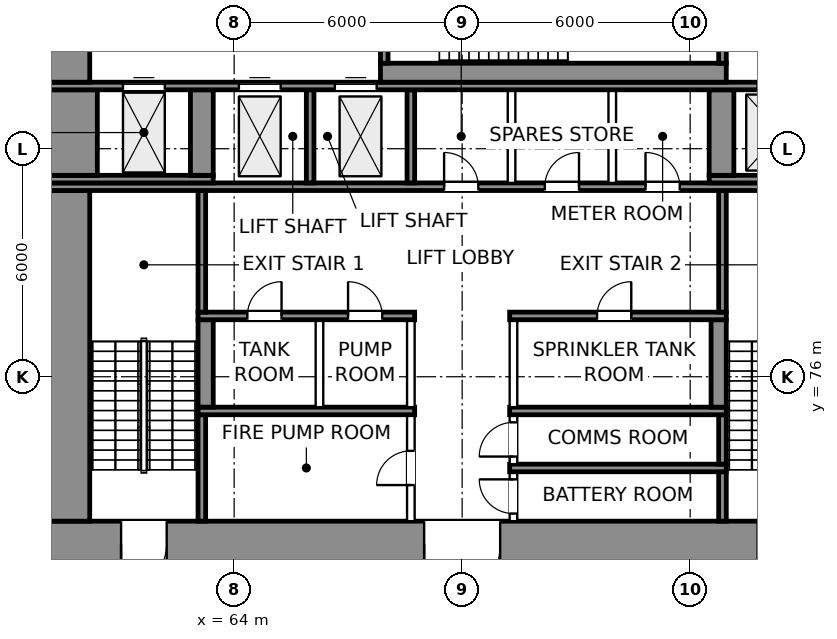
"""IFC4 building model, lengths in metres.
Left out: names, types, materials, properties, quantities, classifications, styles, units other than length and angle.
Written with IfcOpenShell. Run it as: python <this file> out.ifc"""

import sys

from ifc_helpers import new_model, si_unit, direction, frame, frame_2d, origin, place, context, subcontext, project, spatial, rectangle, extrude, element, fill, save


model = new_model("IFC4")
c1 = context("Model", 3, precision=1e-05, world=origin(), true_north=direction((0.0, 1.0)))
c2 = subcontext(c1, "Body", "Model", "MODEL_VIEW")
j1 = project(units=[si_unit("LENGTHUNIT", "METRE"), si_unit("PLANEANGLEUNIT", "RADIAN")], contexts=[c1])
p1 = place(None, origin())
s1 = spatial("IfcSite", under=j1, at=p1, CompositionType="ELEMENT")
p2 = place(p1, origin())
s2 = spatial("IfcBuilding", under=s1, at=p2, CompositionType="ELEMENT")
p3 = place(p2, frame((0.0, 0.0, -10.0)))
s3 = spatial("IfcBuildingStorey", under=s2, at=p3, CompositionType="ELEMENT", Elevation=-10.0)
p4 = place(p3, frame((59.0, 71.6, 0.0), z_axis=(0.0, 0.0, 1.0), x_axis=(1.0, 0.0, 0.0)))
e1 = element("IfcWall", 1, at=p4, inside=s3, PredefinedType="SHEAR", context=c2, shape_type="SweptSolid", body=[
    extrude(rectangle(XDim=22.0, YDim=1.2, at=frame_2d((11.0, 0.0))), origin(), (0.0, 0.0, 1.0), 5.0),
])
p5 = place(p4, frame((2.025, 0.0, 0.0)))
e2 = element("IfcOpeningElement", 2, at=p5, cuts=e1, PredefinedType="OPENING", context=c2, shape_type="SweptSolid", body=[
    extrude(rectangle(XDim=1.2, YDim=2.1, at=frame_2d((0.6, 1.05))), frame((0.0, 0.61, 0.0), z_axis=(0.0, -1.0, 0.0), x_axis=(1.0, 0.0, 0.0)), (0.0, 0.0, 1.0), 1.22),
])
p6 = place(p4, frame((18.775, 0.0, 0.0)))
e3 = element("IfcOpeningElement", 3, at=p6, cuts=e1, PredefinedType="OPENING", context=c2, shape_type="SweptSolid", body=[
    extrude(rectangle(XDim=1.2, YDim=2.1, at=frame_2d((0.6, 1.05))), frame((0.0, 0.61, 0.0), z_axis=(0.0, -1.0, 0.0), x_axis=(1.0, 0.0, 0.0)), (0.0, 0.0, 1.0), 1.22),
])
p7 = place(p4, frame((10.0, 0.0, 0.0)))
e4 = element("IfcOpeningElement", 4, at=p7, cuts=e1, PredefinedType="OPENING", context=c2, shape_type="SweptSolid", body=[
    extrude(rectangle(XDim=2.0, YDim=2.1, at=frame_2d((1.0, 1.05))), frame((0.0, 0.61, 0.0), z_axis=(0.0, -1.0, 0.0), x_axis=(1.0, 0.0, 0.0)), (0.0, 0.0, 1.0), 1.22),
])
p8 = place(p3, frame((59.6, 72.2, 0.0), z_axis=(0.0, 0.0, 1.0), x_axis=(0.0, 1.0, 0.0)))
e5 = element("IfcWall", 5, at=p8, inside=s3, PredefinedType="SHEAR", context=c2, shape_type="SweptSolid", body=[
    extrude(rectangle(XDim=8.7, YDim=1.2, at=frame_2d((4.35, 0.0))), origin(), (0.0, 0.0, 1.0), 5.0),
])
p9 = place(p3, frame((63.15, 72.2, 0.0), z_axis=(0.0, 0.0, 1.0), x_axis=(0.0, 1.0, 0.0)))
e6 = element("IfcWall", 6, at=p9, inside=s3, PredefinedType="SHEAR", context=c2, shape_type="SweptSolid", body=[
    extrude(rectangle(XDim=2.8, YDim=0.2, at=frame_2d((1.4, 0.0))), origin(), (0.0, 0.0, 1.0), 5.0),
])
p10 = place(p3, frame((68.65, 72.2, 0.0), z_axis=(0.0, 0.0, 1.0), x_axis=(0.0, 1.0, 0.0)))
e7 = element("IfcWall", 7, at=p10, inside=s3, PredefinedType="PARTITIONING", context=c2, shape_type="SweptSolid", body=[
    extrude(rectangle(XDim=2.8, YDim=0.2, at=frame_2d((1.4, 0.0))), origin(), (0.0, 0.0, 1.0), 4.65),
])
p11 = place(p10, frame((0.95, 0.0, 0.0)))
e8 = element("IfcOpeningElement", 8, at=p11, cuts=e7, PredefinedType="OPENING", context=c2, shape_type="SweptSolid", body=[
    extrude(rectangle(XDim=0.9, YDim=2.1, at=frame_2d((0.45, 1.05))), frame((0.0, 0.11, 0.0), z_axis=(0.0, -1.0, 0.0), x_axis=(1.0, 0.0, 0.0)), (0.0, 0.0, 1.0), 0.22),
])
p12 = place(p3, frame((71.35, 72.2, 0.0), z_axis=(0.0, 0.0, 1.0), x_axis=(0.0, 1.0, 0.0)))
e9 = element("IfcWall", 9, at=p12, inside=s3, PredefinedType="PARTITIONING", context=c2, shape_type="SweptSolid", body=[
    extrude(rectangle(XDim=1.3, YDim=0.2, at=frame_2d((0.65, 0.0))), origin(), (0.0, 0.0, 1.0), 4.65),
])
p13 = place(p12, frame((0.2, 0.0, 0.0)))
e10 = element("IfcOpeningElement", 10, at=p13, cuts=e9, PredefinedType="OPENING", context=c2, shape_type="SweptSolid", body=[
    extrude(rectangle(XDim=0.9, YDim=2.1, at=frame_2d((0.45, 1.05))), frame((0.0, 0.11, 0.0), z_axis=(0.0, -1.0, 0.0), x_axis=(1.0, 0.0, 0.0)), (0.0, 0.0, 1.0), 0.22),
])
p14 = place(p3, frame((76.85, 72.2, 0.0), z_axis=(0.0, 0.0, 1.0), x_axis=(0.0, 1.0, 0.0)))
e11 = element("IfcWall", 11, at=p14, inside=s3, PredefinedType="SHEAR", context=c2, shape_type="SweptSolid", body=[
    extrude(rectangle(XDim=1.3, YDim=0.2, at=frame_2d((0.65, 0.0))), origin(), (0.0, 0.0, 1.0), 5.0),
])
p15 = place(p3, frame((71.25, 73.6, 0.0), z_axis=(0.0, 0.0, 1.0), x_axis=(1.0, 0.0, 0.0)))
e12 = element("IfcWall", 12, at=p15, inside=s3, PredefinedType="SHEAR", context=c2, shape_type="SweptSolid", body=[
    extrude(rectangle(XDim=5.7, YDim=0.2, at=frame_2d((2.85, 0.0))), origin(), (0.0, 0.0, 1.0), 5.0),
])
p16 = place(p3, frame((71.35, 73.7, 0.0), z_axis=(0.0, 0.0, 1.0), x_axis=(0.0, 1.0, 0.0)))
e13 = element("IfcWall", 13, at=p16, inside=s3, PredefinedType="PARTITIONING", context=c2, shape_type="SweptSolid", body=[
    extrude(rectangle(XDim=1.3, YDim=0.2, at=frame_2d((0.65, 0.0))), origin(), (0.0, 0.0, 1.0), 4.65),
])
p17 = place(p16, frame((0.2, 0.0, 0.0)))
e14 = element("IfcOpeningElement", 14, at=p17, cuts=e13, PredefinedType="OPENING", context=c2, shape_type="SweptSolid", body=[
    extrude(rectangle(XDim=0.9, YDim=2.1, at=frame_2d((0.45, 1.05))), frame((0.0, 0.11, 0.0), z_axis=(0.0, -1.0, 0.0), x_axis=(1.0, 0.0, 0.0)), (0.0, 0.0, 1.0), 0.22),
])
p18 = place(p3, frame((76.85, 73.7, 0.0), z_axis=(0.0, 0.0, 1.0), x_axis=(0.0, 1.0, 0.0)))
e15 = element("IfcWall", 15, at=p18, inside=s3, PredefinedType="SHEAR", context=c2, shape_type="SweptSolid", body=[
    extrude(rectangle(XDim=1.3, YDim=0.2, at=frame_2d((0.65, 0.0))), origin(), (0.0, 0.0, 1.0), 5.0),
])
for number, where, z_axis, x_axis in (
    (16, (63.05, 75.1, 0.0), (0.0, 0.0, 1.0), (1.0, 0.0, 0.0)),
    (17, (71.25, 75.1, 0.0), (0.0, 0.0, 1.0), (1.0, 0.0, 0.0)),
):
    element("IfcWall", number, at=place(p3, frame(where, z_axis=z_axis, x_axis=x_axis)), inside=s3, PredefinedType="SHEAR", context=c2, shape_type="SweptSolid", body=[
        extrude(rectangle(XDim=5.7, YDim=0.2, at=frame_2d((2.85, 0.0))), origin(), (0.0, 0.0, 1.0), 5.0),
    ])
p19 = place(p3, frame((63.25, 75.2, 0.0), z_axis=(0.0, 0.0, 1.0), x_axis=(0.0, 1.0, 0.0)))
e18 = element("IfcWall", 18, at=p19, inside=s3, PredefinedType="SHEAR", context=c2, shape_type="SweptSolid", body=[
    extrude(rectangle(XDim=2.3, YDim=0.4, at=frame_2d((1.15, 0.0))), origin(), (0.0, 0.0, 1.0), 5.0),
])
for number, where, z_axis, x_axis in (
    (19, (66.245, 75.2, 0.0), (0.0, 0.0, 1.0), (0.0, 1.0, 0.0)),
    (20, (68.65, 75.2, 0.0), (0.0, 0.0, 1.0), (0.0, 1.0, 0.0)),
    (21, (71.35, 75.2, 0.0), (0.0, 0.0, 1.0), (0.0, 1.0, 0.0)),
):
    element("IfcWall", number, at=place(p3, frame(where, z_axis=z_axis, x_axis=x_axis)), inside=s3, PredefinedType="PARTITIONING", context=c2, shape_type="SweptSolid", body=[
        extrude(rectangle(XDim=2.3, YDim=0.2, at=frame_2d((1.15, 0.0))), origin(), (0.0, 0.0, 1.0), 4.65),
    ])
p20 = place(p3, frame((76.75, 75.2, 0.0), z_axis=(0.0, 0.0, 1.0), x_axis=(0.0, 1.0, 0.0)))
e22 = element("IfcWall", 22, at=p20, inside=s3, PredefinedType="SHEAR", context=c2, shape_type="SweptSolid", body=[
    extrude(rectangle(XDim=2.3, YDim=0.4, at=frame_2d((1.15, 0.0))), origin(), (0.0, 0.0, 1.0), 5.0),
])
p21 = place(p3, frame((63.05, 77.6, 0.0), z_axis=(0.0, 0.0, 1.0), x_axis=(1.0, 0.0, 0.0)))
e23 = element("IfcWall", 23, at=p21, inside=s3, PredefinedType="SHEAR", context=c2, shape_type="SweptSolid", body=[
    extrude(rectangle(XDim=5.7, YDim=0.2, at=frame_2d((2.85, 0.0))), origin(), (0.0, 0.0, 1.0), 5.0),
])
p22 = place(p21, frame((1.298, 0.0, 0.0)))
e24 = element("IfcOpeningElement", 24, at=p22, cuts=e23, PredefinedType="OPENING", context=c2, shape_type="SweptSolid", body=[
    extrude(rectangle(XDim=0.9, YDim=2.1, at=frame_2d((0.45, 1.05))), frame((0.0, 0.11, 0.0), z_axis=(0.0, -1.0, 0.0), x_axis=(1.0, 0.0, 0.0)), (0.0, 0.0, 1.0), 0.22),
])
p23 = place(p21, frame((3.948, 0.0, 0.0)))
e25 = element("IfcOpeningElement", 25, at=p23, cuts=e23, PredefinedType="OPENING", context=c2, shape_type="SweptSolid", body=[
    extrude(rectangle(XDim=0.9, YDim=2.1, at=frame_2d((0.45, 1.05))), frame((0.0, 0.11, 0.0), z_axis=(0.0, -1.0, 0.0), x_axis=(1.0, 0.0, 0.0)), (0.0, 0.0, 1.0), 0.22),
])
p24 = place(p3, frame((71.25, 77.6, 0.0), z_axis=(0.0, 0.0, 1.0), x_axis=(1.0, 0.0, 0.0)))
e26 = element("IfcWall", 26, at=p24, inside=s3, PredefinedType="SHEAR", context=c2, shape_type="SweptSolid", body=[
    extrude(rectangle(XDim=5.7, YDim=0.2, at=frame_2d((2.85, 0.0))), origin(), (0.0, 0.0, 1.0), 5.0),
])
p25 = place(p24, frame((2.3, 0.0, 0.0)))
e27 = element("IfcOpeningElement", 27, at=p25, cuts=e26, PredefinedType="OPENING", context=c2, shape_type="SweptSolid", body=[
    extrude(rectangle(XDim=0.9, YDim=2.1, at=frame_2d((0.45, 1.05))), frame((0.0, 0.11, 0.0), z_axis=(0.0, -1.0, 0.0), x_axis=(1.0, 0.0, 0.0)), (0.0, 0.0, 1.0), 0.22),
])
for number, where, z_axis, x_axis in (
    (28, (63.15, 77.7, 0.0), (0.0, 0.0, 1.0), (0.0, 1.0, 0.0)),
    (29, (76.85, 77.7, 0.0), (0.0, 0.0, 1.0), (0.0, 1.0, 0.0)),
):
    element("IfcWall", number, at=place(p3, frame(where, z_axis=z_axis, x_axis=x_axis)), inside=s3, PredefinedType="SHEAR", context=c2, shape_type="SweptSolid", body=[
        extrude(rectangle(XDim=3.2, YDim=0.2, at=frame_2d((1.6, 0.0))), origin(), (0.0, 0.0, 1.0), 5.0),
    ])
p26 = place(p3, frame((59.0, 81.0, 0.0), z_axis=(0.0, 0.0, 1.0), x_axis=(1.0, 0.0, 0.0)))
e30 = element("IfcWall", 30, at=p26, inside=s3, PredefinedType="SHEAR", context=c2, shape_type="SweptSolid", body=[
    extrude(rectangle(XDim=22.0, YDim=0.2, at=frame_2d((11.0, 0.0))), origin(), (0.0, 0.0, 1.0), 5.0),
])
p27 = place(p26, frame((10.525, 0.0, 0.0)))
e31 = element("IfcOpeningElement", 31, at=p27, cuts=e30, PredefinedType="OPENING", context=c2, shape_type="SweptSolid", body=[
    extrude(rectangle(XDim=0.9, YDim=2.1, at=frame_2d((0.45, 1.05))), frame((0.0, 0.11, 0.0), z_axis=(0.0, -1.0, 0.0), x_axis=(1.0, 0.0, 0.0)), (0.0, 0.0, 1.0), 0.22),
])
p28 = place(p26, frame((13.175, 0.0, 0.0)))
e32 = element("IfcOpeningElement", 32, at=p28, cuts=e30, PredefinedType="OPENING", context=c2, shape_type="SweptSolid", body=[
    extrude(rectangle(XDim=0.9, YDim=2.1, at=frame_2d((0.45, 1.05))), frame((0.0, 0.11, 0.0), z_axis=(0.0, -1.0, 0.0), x_axis=(1.0, 0.0, 0.0)), (0.0, 0.0, 1.0), 0.22),
])
p29 = place(p26, frame((15.825, 0.0, 0.0)))
e33 = element("IfcOpeningElement", 33, at=p29, cuts=e30, PredefinedType="OPENING", context=c2, shape_type="SweptSolid", body=[
    extrude(rectangle(XDim=0.9, YDim=2.1, at=frame_2d((0.45, 1.05))), frame((0.0, 0.11, 0.0), z_axis=(0.0, -1.0, 0.0), x_axis=(1.0, 0.0, 0.0)), (0.0, 0.0, 1.0), 0.22),
])
p30 = place(p3, frame((59.0, 81.2, 0.0), z_axis=(0.0, 0.0, 1.0), x_axis=(1.0, 0.0, 0.0)))
e34 = element("IfcWall", 34, at=p30, inside=s3, PredefinedType="SHEAR", context=c2, shape_type="SweptSolid", body=[
    extrude(rectangle(XDim=4.45, YDim=0.2, at=frame_2d((2.225, 0.0))), origin(), (0.0, 0.0, 1.0), 5.0),
])
for number, where, z_axis, x_axis in (
    (35, (66.0, 81.1, 0.0), (0.0, 0.0, 1.0), (0.0, 1.0, 0.0)),
    (36, (68.65, 81.1, 0.0), (0.0, 0.0, 1.0), (0.0, 1.0, 0.0)),
):
    element("IfcWall", number, at=place(p3, frame(where, z_axis=z_axis, x_axis=x_axis)), inside=s3, PredefinedType="SHEAR", context=c2, shape_type="SweptSolid", body=[
        extrude(rectangle(XDim=2.45, YDim=0.2, at=frame_2d((1.225, 0.0))), origin(), (0.0, 0.0, 1.0), 5.0),
    ])
for number, where, z_axis, x_axis in (
    (37, (71.3, 81.1, 0.0), (0.0, 0.0, 1.0), (0.0, 1.0, 0.0)),
    (38, (73.95, 81.1, 0.0), (0.0, 0.0, 1.0), (0.0, 1.0, 0.0)),
):
    element("IfcWall", number, at=place(p3, frame(where, z_axis=z_axis, x_axis=x_axis)), inside=s3, PredefinedType="PARTITIONING", context=c2, shape_type="SweptSolid", body=[
        extrude(rectangle(XDim=2.45, YDim=0.2, at=frame_2d((1.225, 0.0))), origin(), (0.0, 0.0, 1.0), 4.65),
    ])
p31 = place(p3, frame((76.5, 81.2, 0.0), z_axis=(0.0, 0.0, 1.0), x_axis=(1.0, 0.0, 0.0)))
e39 = element("IfcWall", 39, at=p31, inside=s3, PredefinedType="SHEAR", context=c2, shape_type="SweptSolid", body=[
    extrude(rectangle(XDim=4.5, YDim=0.2, at=frame_2d((2.25, 0.0))), origin(), (0.0, 0.0, 1.0), 5.0),
])
p32 = place(p3, frame((59.7, 81.3, 0.0), z_axis=(0.0, 0.0, 1.0), x_axis=(0.0, 1.0, 0.0)))
e40 = element("IfcWall", 40, at=p32, inside=s3, PredefinedType="SHEAR", context=c2, shape_type="SweptSolid", body=[
    extrude(rectangle(XDim=2.25, YDim=1.4, at=frame_2d((1.125, 0.0))), origin(), (0.0, 0.0, 1.0), 5.0),
])
p33 = place(p3, frame((63.15, 81.3, 0.0), z_axis=(0.0, 0.0, 1.0), x_axis=(0.0, 1.0, 0.0)))
e41 = element("IfcWall", 41, at=p33, inside=s3, PredefinedType="SHEAR", context=c2, shape_type="SweptSolid", body=[
    extrude(rectangle(XDim=2.25, YDim=0.6, at=frame_2d((1.125, 0.0))), origin(), (0.0, 0.0, 1.0), 5.0),
])
p34 = place(p3, frame((76.825, 81.3, 0.0), z_axis=(0.0, 0.0, 1.0), x_axis=(0.0, 1.0, 0.0)))
e42 = element("IfcWall", 42, at=p34, inside=s3, PredefinedType="SHEAR", context=c2, shape_type="SweptSolid", body=[
    extrude(rectangle(XDim=2.25, YDim=0.65, at=frame_2d((1.125, 0.0))), origin(), (0.0, 0.0, 1.0), 5.0),
])
p35 = place(p3, frame((59.0, 83.65, 0.0), z_axis=(0.0, 0.0, 1.0), x_axis=(1.0, 0.0, 0.0)))
e43 = element("IfcWall", 43, at=p35, inside=s3, PredefinedType="SHEAR", context=c2, shape_type="SweptSolid", body=[
    extrude(rectangle(XDim=22.0, YDim=0.2, at=frame_2d((11.0, 0.0))), origin(), (0.0, 0.0, 1.0), 5.0),
])
p36 = place(p35, frame((5.125, 0.0, 0.0)))
e44 = element("IfcOpeningElement", 44, at=p36, cuts=e43, PredefinedType="OPENING", context=c2, shape_type="SweptSolid", body=[
    extrude(rectangle(XDim=1.1, YDim=2.1, at=frame_2d((0.55, 1.05))), frame((0.0, 0.11, 0.0), z_axis=(0.0, -1.0, 0.0), x_axis=(1.0, 0.0, 0.0)), (0.0, 0.0, 1.0), 0.22),
])
p37 = place(p35, frame((7.65, 0.0, 0.0)))
e45 = element("IfcOpeningElement", 45, at=p37, cuts=e43, PredefinedType="OPENING", context=c2, shape_type="SweptSolid", body=[
    extrude(rectangle(XDim=1.1, YDim=2.1, at=frame_2d((0.55, 1.05))), frame((0.0, 0.11, 0.0), z_axis=(0.0, -1.0, 0.0), x_axis=(1.0, 0.0, 0.0)), (0.0, 0.0, 1.0), 0.22),
])
p38 = place(p35, frame((18.775, 0.0, 0.0)))
e46 = element("IfcOpeningElement", 46, at=p38, cuts=e43, PredefinedType="OPENING", context=c2, shape_type="SweptSolid", body=[
    extrude(rectangle(XDim=1.2, YDim=2.1, at=frame_2d((0.6, 1.05))), frame((0.0, 0.11, 0.0), z_axis=(0.0, -1.0, 0.0), x_axis=(1.0, 0.0, 0.0)), (0.0, 0.0, 1.0), 0.22),
])
p39 = place(p35, frame((2.075, 0.0, 0.0)))
e47 = element("IfcOpeningElement", 47, at=p39, cuts=e43, PredefinedType="OPENING", context=c2, shape_type="SweptSolid", body=[
    extrude(rectangle(XDim=1.1, YDim=2.1, at=frame_2d((0.55, 1.05))), frame((0.0, 0.11, 0.0), z_axis=(0.0, -1.0, 0.0), x_axis=(1.0, 0.0, 0.0)), (0.0, 0.0, 1.0), 0.22),
])
p40 = place(p3, frame((59.6, 83.75, 0.0), z_axis=(0.0, 0.0, 1.0), x_axis=(0.0, 1.0, 0.0)))
e48 = element("IfcWall", 48, at=p40, inside=s3, PredefinedType="SHEAR", context=c2, shape_type="SweptSolid", body=[
    extrude(rectangle(XDim=3.05, YDim=1.2, at=frame_2d((1.525, 0.0))), origin(), (0.0, 0.0, 1.0), 5.0),
])
p41 = place(p40, frame((0.975, 0.0, 0.0)))
e49 = element("IfcOpeningElement", 49, at=p41, cuts=e48, PredefinedType="OPENING", context=c2, shape_type="SweptSolid", body=[
    extrude(rectangle(XDim=1.1, YDim=2.1, at=frame_2d((0.55, 1.05))), frame((0.0, 0.61, 0.0), z_axis=(0.0, -1.0, 0.0), x_axis=(1.0, 0.0, 0.0)), (0.0, 0.0, 1.0), 1.22),
])
p42 = place(p3, frame((67.85, 84.0, 0.0), z_axis=(0.0, 0.0, 1.0), x_axis=(1.0, 0.0, 0.0)))
e50 = element("IfcWall", 50, at=p42, inside=s3, PredefinedType="SHEAR", context=c2, shape_type="SweptSolid", body=[
    extrude(rectangle(XDim=9.1, YDim=0.5, at=frame_2d((4.55, 0.0))), origin(), (0.0, 0.0, 1.0), 5.0),
])
p43 = place(p3, frame((67.95, 84.25, 0.0), z_axis=(0.0, 0.0, 1.0), x_axis=(0.0, 1.0, 0.0)))
e51 = element("IfcWall", 51, at=p43, inside=s3, PredefinedType="SHEAR", context=c2, shape_type="SweptSolid", body=[
    extrude(rectangle(XDim=2.55, YDim=0.2, at=frame_2d((1.275, 0.0))), origin(), (0.0, 0.0, 1.0), 5.0),
])
p44 = place(p43, frame((0.825, 0.0, 0.0)))
e52 = element("IfcOpeningElement", 52, at=p44, cuts=e51, PredefinedType="OPENING", context=c2, shape_type="SweptSolid", body=[
    extrude(rectangle(XDim=1.2, YDim=2.1, at=frame_2d((0.6, 1.05))), frame((0.0, 0.11, 0.0), z_axis=(0.0, -1.0, 0.0), x_axis=(1.0, 0.0, 0.0)), (0.0, 0.0, 1.0), 0.22),
])
p45 = place(p3, frame((76.85, 84.25, 0.0), z_axis=(0.0, 0.0, 1.0), x_axis=(0.0, 1.0, 0.0)))
e53 = element("IfcWall", 53, at=p45, inside=s3, PredefinedType="SHEAR", context=c2, shape_type="SweptSolid", body=[
    extrude(rectangle(XDim=2.55, YDim=0.2, at=frame_2d((1.275, 0.0))), origin(), (0.0, 0.0, 1.0), 5.0),
])
p46 = place(p5, frame((1.2, 0.0, 0.0), z_axis=(0.0, 0.0, 1.0), x_axis=(-1.0, 0.0, 0.0)))
e54 = element("IfcDoor", 54, at=p46, inside=s3, OperationType="SINGLE_SWING_RIGHT", PredefinedType="DOOR", context=c2, shape_type="SweptSolid", body=[
    extrude(rectangle(XDim=1.2, YDim=2.1, at=frame_2d((0.6, 1.05))), frame((0.0, 0.025, 0.0), z_axis=(0.0, -1.0, 0.0), x_axis=(1.0, 0.0, 0.0)), (0.0, 0.0, 1.0), 0.05),
])
fill(e2, e54)
p47 = place(p7, frame((2.0, 0.0, 0.0), z_axis=(0.0, 0.0, 1.0), x_axis=(-1.0, 0.0, 0.0)))
e55 = element("IfcDoor", 55, at=p47, inside=s3, OperationType="DOUBLE_DOOR_SINGLE_SWING", PredefinedType="DOOR", context=c2, shape_type="SweptSolid", body=[
    extrude(rectangle(XDim=2.0, YDim=2.1, at=frame_2d((1.0, 1.05))), frame((0.0, 0.025, 0.0), z_axis=(0.0, -1.0, 0.0), x_axis=(1.0, 0.0, 0.0)), (0.0, 0.0, 1.0), 0.05),
])
fill(e4, e55)
p48 = place(p11, origin())
e56 = element("IfcDoor", 56, at=p48, inside=s3, OperationType="SINGLE_SWING_LEFT", PredefinedType="DOOR", context=c2, shape_type="SweptSolid", body=[
    extrude(rectangle(XDim=0.9, YDim=2.1, at=frame_2d((0.45, 1.05))), frame((0.0, 0.025, 0.0), z_axis=(0.0, -1.0, 0.0), x_axis=(1.0, 0.0, 0.0)), (0.0, 0.0, 1.0), 0.05),
])
fill(e8, e56)
p49 = place(p13, origin())
e57 = element("IfcDoor", 57, at=p49, inside=s3, OperationType="SINGLE_SWING_RIGHT", PredefinedType="DOOR", context=c2, shape_type="SweptSolid", body=[
    extrude(rectangle(XDim=0.9, YDim=2.1, at=frame_2d((0.45, 1.05))), frame((0.0, 0.025, 0.0), z_axis=(0.0, -1.0, 0.0), x_axis=(1.0, 0.0, 0.0)), (0.0, 0.0, 1.0), 0.05),
])
fill(e10, e57)
p50 = place(p17, origin())
e58 = element("IfcDoor", 58, at=p50, inside=s3, OperationType="SINGLE_SWING_LEFT", PredefinedType="DOOR", context=c2, shape_type="SweptSolid", body=[
    extrude(rectangle(XDim=0.9, YDim=2.1, at=frame_2d((0.45, 1.05))), frame((0.0, 0.025, 0.0), z_axis=(0.0, -1.0, 0.0), x_axis=(1.0, 0.0, 0.0)), (0.0, 0.0, 1.0), 0.05),
])
fill(e14, e58)
p51 = place(p36, origin())
e59 = element("IfcDoor", 59, at=p51, inside=s3, OperationType="DOUBLE_DOOR_SLIDING", PredefinedType="DOOR", context=c2, shape_type="SweptSolid", body=[
    extrude(rectangle(XDim=1.1, YDim=2.1, at=frame_2d((0.55, 1.05))), frame((0.0, 0.025, 0.0), z_axis=(0.0, -1.0, 0.0), x_axis=(1.0, 0.0, 0.0)), (0.0, 0.0, 1.0), 0.05),
])
fill(e44, e59)
p52 = place(p37, origin())
e60 = element("IfcDoor", 60, at=p52, inside=s3, OperationType="DOUBLE_DOOR_SLIDING", PredefinedType="DOOR", context=c2, shape_type="SweptSolid", body=[
    extrude(rectangle(XDim=1.1, YDim=2.1, at=frame_2d((0.55, 1.05))), frame((0.0, 0.025, 0.0), z_axis=(0.0, -1.0, 0.0), x_axis=(1.0, 0.0, 0.0)), (0.0, 0.0, 1.0), 0.05),
])
fill(e45, e60)
p53 = place(p39, origin())
e61 = element("IfcDoor", 61, at=p53, inside=s3, OperationType="DOUBLE_DOOR_SLIDING", PredefinedType="DOOR", context=c2, shape_type="SweptSolid", body=[
    extrude(rectangle(XDim=1.1, YDim=2.1, at=frame_2d((0.55, 1.05))), frame((0.0, 0.025, 0.0), z_axis=(0.0, -1.0, 0.0), x_axis=(1.0, 0.0, 0.0)), (0.0, 0.0, 1.0), 0.05),
])
fill(e47, e61)
p54 = place(p22, origin())
e62 = element("IfcDoor", 62, at=p54, inside=s3, OperationType="SINGLE_SWING_RIGHT", PredefinedType="DOOR", context=c2, shape_type="SweptSolid", body=[
    extrude(rectangle(XDim=0.9, YDim=2.1, at=frame_2d((0.45, 1.05))), frame((0.0, 0.025, 0.0), z_axis=(0.0, -1.0, 0.0), x_axis=(1.0, 0.0, 0.0)), (0.0, 0.0, 1.0), 0.05),
])
fill(e24, e62)
p55 = place(p23, origin())
e63 = element("IfcDoor", 63, at=p55, inside=s3, OperationType="SINGLE_SWING_LEFT", PredefinedType="DOOR", context=c2, shape_type="SweptSolid", body=[
    extrude(rectangle(XDim=0.9, YDim=2.1, at=frame_2d((0.45, 1.05))), frame((0.0, 0.025, 0.0), z_axis=(0.0, -1.0, 0.0), x_axis=(1.0, 0.0, 0.0)), (0.0, 0.0, 1.0), 0.05),
])
fill(e25, e63)
p56 = place(p25, origin())
e64 = element("IfcDoor", 64, at=p56, inside=s3, OperationType="SINGLE_SWING_RIGHT", PredefinedType="DOOR", context=c2, shape_type="SweptSolid", body=[
    extrude(rectangle(XDim=0.9, YDim=2.1, at=frame_2d((0.45, 1.05))), frame((0.0, 0.025, 0.0), z_axis=(0.0, -1.0, 0.0), x_axis=(1.0, 0.0, 0.0)), (0.0, 0.0, 1.0), 0.05),
])
fill(e27, e64)
p57 = place(p27, origin())
e65 = element("IfcDoor", 65, at=p57, inside=s3, OperationType="SINGLE_SWING_LEFT", PredefinedType="DOOR", context=c2, shape_type="SweptSolid", body=[
    extrude(rectangle(XDim=0.9, YDim=2.1, at=frame_2d((0.45, 1.05))), frame((0.0, 0.025, 0.0), z_axis=(0.0, -1.0, 0.0), x_axis=(1.0, 0.0, 0.0)), (0.0, 0.0, 1.0), 0.05),
])
fill(e31, e65)
p58 = place(p28, origin())
e66 = element("IfcDoor", 66, at=p58, inside=s3, OperationType="SINGLE_SWING_RIGHT", PredefinedType="DOOR", context=c2, shape_type="SweptSolid", body=[
    extrude(rectangle(XDim=0.9, YDim=2.1, at=frame_2d((0.45, 1.05))), frame((0.0, 0.025, 0.0), z_axis=(0.0, -1.0, 0.0), x_axis=(1.0, 0.0, 0.0)), (0.0, 0.0, 1.0), 0.05),
])
fill(e32, e66)
p59 = place(p29, origin())
e67 = element("IfcDoor", 67, at=p59, inside=s3, OperationType="SINGLE_SWING_LEFT", PredefinedType="DOOR", context=c2, shape_type="SweptSolid", body=[
    extrude(rectangle(XDim=0.9, YDim=2.1, at=frame_2d((0.45, 1.05))), frame((0.0, 0.025, 0.0), z_axis=(0.0, -1.0, 0.0), x_axis=(1.0, 0.0, 0.0)), (0.0, 0.0, 1.0), 0.05),
])
fill(e33, e67)
save(model, sys.argv[1])
